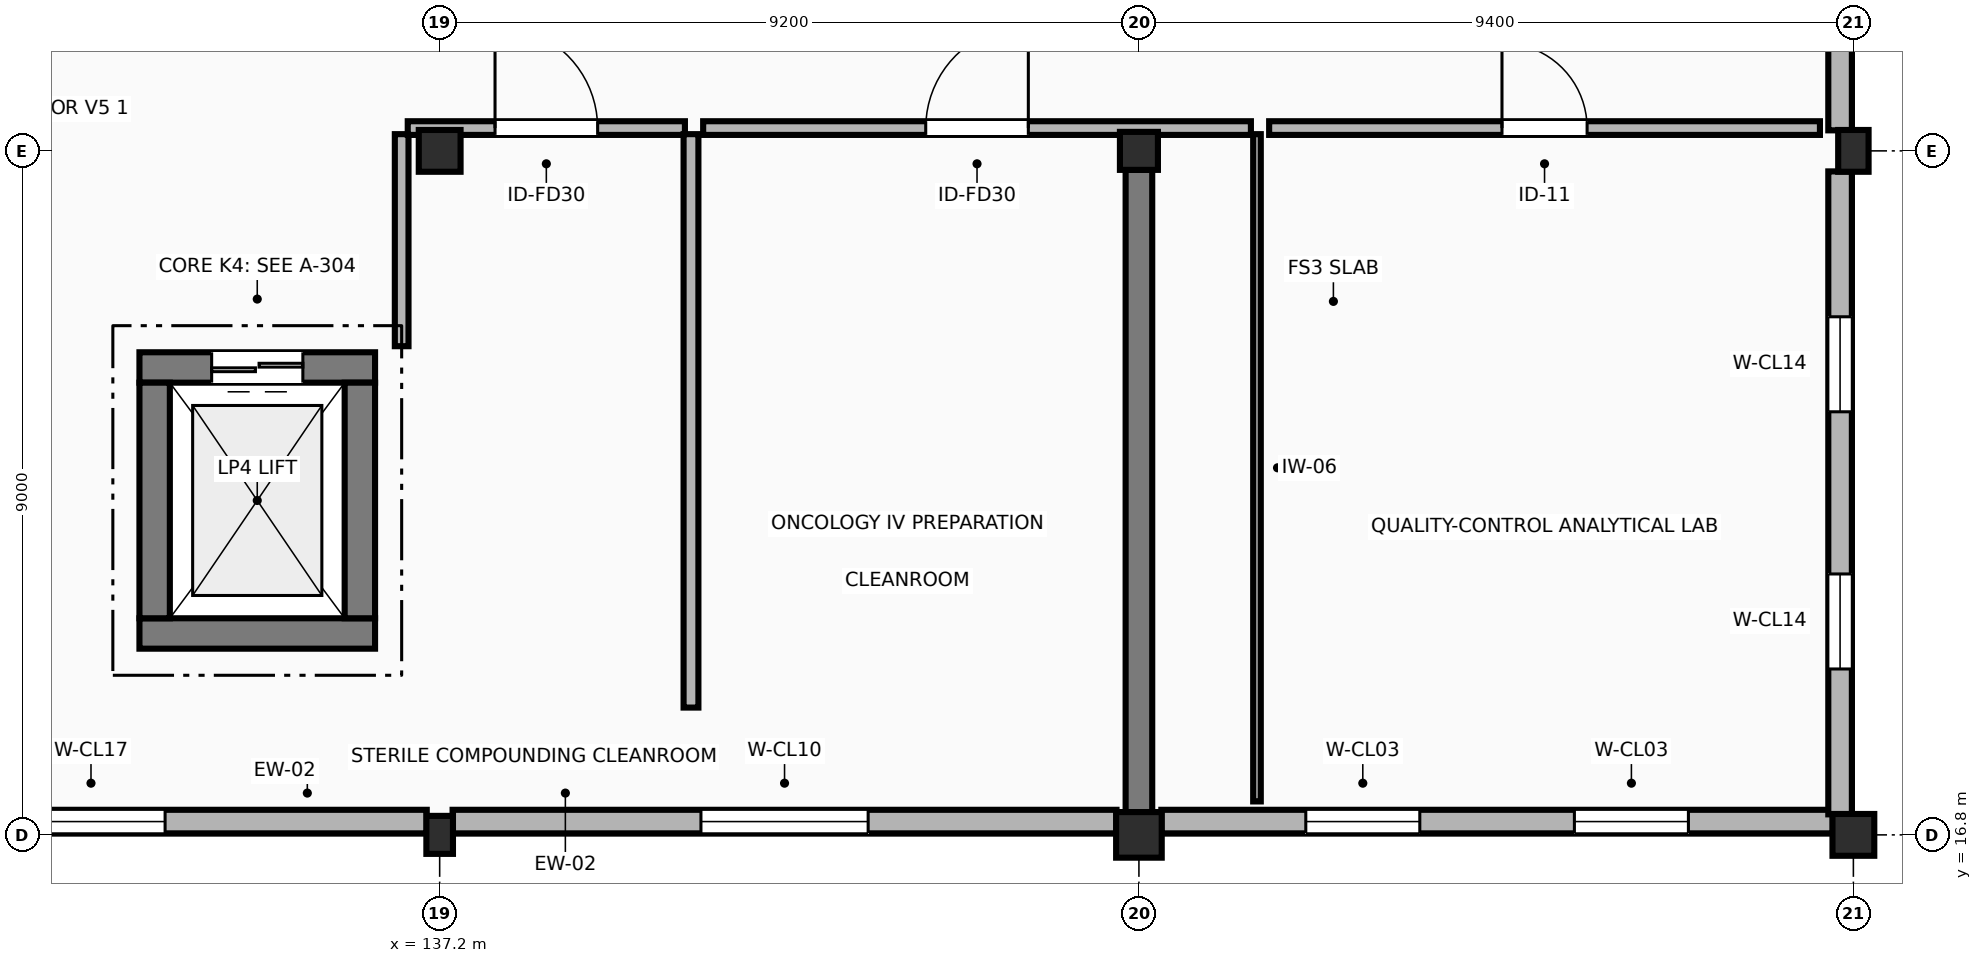
"""IFC4 building model, lengths in metres.
Left out: names, types, materials, properties, quantities, classifications, styles, units other than length and angle.
Written with IfcOpenShell. Run it as: python <this file> out.ifc"""

import sys

from ifc_helpers import new_model, si_unit, direction, frame, frame_2d, origin, origin_2d, place, context, subcontext, project, spatial, rectangle, extrude, element, fill, save


model = new_model("IFC4")
c1 = context("Model", 3, precision=1e-05, world=origin(), true_north=direction((0.0, 1.0)))
c2 = subcontext(c1, "Body", "Model", "MODEL_VIEW")
j1 = project(units=[si_unit("LENGTHUNIT", "METRE"), si_unit("PLANEANGLEUNIT", "RADIAN")], contexts=[c1])
p1 = place(None, origin())
s1 = spatial("IfcSite", under=j1, at=p1, CompositionType="ELEMENT")
p2 = place(p1, origin())
s2 = spatial("IfcBuilding", under=s1, at=p2, CompositionType="ELEMENT")
p3 = place(p2, frame((0.0, 0.0, 9.6)))
s3 = spatial("IfcBuildingStorey", under=s2, at=p3, CompositionType="ELEMENT", Elevation=9.6)
p4 = place(p3, frame((137.2, 16.8, 0.0), z_axis=(0.0, 0.0, 1.0), x_axis=(1.0, 0.0, 0.0)))
e1 = element("IfcColumn", 1, at=p4, inside=s3, PredefinedType="COLUMN", context=c2, shape_type="SweptSolid", body=[
    extrude(rectangle(XDim=0.35, YDim=0.5, at=origin_2d()), origin(), (0.0, 0.0, 1.0), 4.2),
])
p5 = place(p3, frame((137.2, 25.8, 0.0), z_axis=(0.0, 0.0, 1.0), x_axis=(1.0, 0.0, 0.0)))
e2 = element("IfcColumn", 2, at=p5, inside=s3, PredefinedType="COLUMN", context=c2, shape_type="SweptSolid", body=[
    extrude(rectangle(XDim=0.55, YDim=0.55, at=origin_2d()), origin(), (0.0, 0.0, 1.0), 4.2),
])
p6 = place(p3, frame((146.4, 16.8, 0.0), z_axis=(0.0, 0.0, 1.0), x_axis=(1.0, 0.0, 0.0)))
e3 = element("IfcColumn", 3, at=p6, inside=s3, PredefinedType="COLUMN", context=c2, shape_type="SweptSolid", body=[
    extrude(rectangle(XDim=0.6, YDim=0.6, at=origin_2d()), origin(), (0.0, 0.0, 1.0), 4.2),
])
p7 = place(p3, frame((146.4, 25.8, 0.0), z_axis=(0.0, 0.0, 1.0), x_axis=(1.0, 0.0, 0.0)))
e4 = element("IfcColumn", 4, at=p7, inside=s3, PredefinedType="COLUMN", context=c2, shape_type="SweptSolid", body=[
    extrude(rectangle(XDim=0.5, YDim=0.5, at=origin_2d()), origin(), (0.0, 0.0, 1.0), 4.2),
])
p8 = place(p3, frame((155.8, 16.8, 0.0), z_axis=(0.0, 0.0, 1.0), x_axis=(1.0, 0.0, 0.0)))
e5 = element("IfcColumn", 5, at=p8, inside=s3, PredefinedType="COLUMN", context=c2, shape_type="SweptSolid", body=[
    extrude(rectangle(XDim=0.55, YDim=0.55, at=origin_2d()), origin(), (0.0, 0.0, 1.0), 4.2),
])
p9 = place(p3, frame((155.8, 25.8, 0.0), z_axis=(0.0, 0.0, 1.0), x_axis=(1.0, 0.0, 0.0)))
e6 = element("IfcColumn", 6, at=p9, inside=s3, PredefinedType="COLUMN", context=c2, shape_type="SweptSolid", body=[
    extrude(rectangle(XDim=0.4, YDim=0.55, at=origin_2d()), origin(), (0.0, 0.0, 1.0), 4.2),
])
p10 = place(p3, frame((128.195, 16.975, 0.0), z_axis=(0.0, 0.0, 1.0), x_axis=(1.0, 0.0, 0.0)))
e7 = element("IfcWall", 7, at=p10, inside=s3, PredefinedType="STANDARD", context=c2, shape_type="SweptSolid", body=[
    extrude(rectangle(XDim=8.835, YDim=0.31, at=frame_2d((4.417, 0.0))), origin(), (0.0, 0.0, 1.0), 3.255),
])
p11 = place(p10, frame((3.442, 0.0, 0.95)))
e8 = element("IfcOpeningElement", 8, at=p11, cuts=e7, PredefinedType="OPENING", context=c2, shape_type="SweptSolid", body=[
    extrude(rectangle(XDim=1.95, YDim=1.55, at=frame_2d((0.975, 0.775))), frame((0.0, 0.165, 0.0), z_axis=(0.0, -1.0, 0.0), x_axis=(1.0, 0.0, 0.0)), (0.0, 0.0, 1.0), 0.33),
])
p12 = place(p3, frame((137.37, 16.975, 0.0), z_axis=(0.0, 0.0, 1.0), x_axis=(1.0, 0.0, 0.0)))
e9 = element("IfcWall", 9, at=p12, inside=s3, PredefinedType="STANDARD", context=c2, shape_type="SweptSolid", body=[
    extrude(rectangle(XDim=8.735, YDim=0.31, at=frame_2d((4.367, 0.0))), origin(), (0.0, 0.0, 1.0), 3.255),
])
p13 = place(p12, frame((3.268, 0.0, 1.75)))
e10 = element("IfcOpeningElement", 10, at=p13, cuts=e9, PredefinedType="OPENING", context=c2, shape_type="SweptSolid", body=[
    extrude(rectangle(XDim=2.2, YDim=0.85, at=frame_2d((1.1, 0.425))), frame((0.0, 0.165, 0.0), z_axis=(0.0, -1.0, 0.0), x_axis=(1.0, 0.0, 0.0)), (0.0, 0.0, 1.0), 0.33),
])
p14 = place(p3, frame((146.695, 16.975, 0.0), z_axis=(0.0, 0.0, 1.0), x_axis=(1.0, 0.0, 0.0)))
e11 = element("IfcWall", 11, at=p14, inside=s3, PredefinedType="STANDARD", context=c2, shape_type="SweptSolid", body=[
    extrude(rectangle(XDim=8.835, YDim=0.31, at=frame_2d((4.417, 0.0))), origin(), (0.0, 0.0, 1.0), 3.255),
])
p15 = place(p14, frame((1.9, 0.0, 0.95)))
e12 = element("IfcOpeningElement", 12, at=p15, cuts=e11, PredefinedType="OPENING", context=c2, shape_type="SweptSolid", body=[
    extrude(rectangle(XDim=1.5, YDim=1.65, at=frame_2d((0.75, 0.825))), frame((0.0, 0.165, 0.0), z_axis=(0.0, -1.0, 0.0), x_axis=(1.0, 0.0, 0.0)), (0.0, 0.0, 1.0), 0.33),
])
p16 = place(p14, frame((5.435, 0.0, 0.95)))
e13 = element("IfcOpeningElement", 13, at=p16, cuts=e11, PredefinedType="OPENING", context=c2, shape_type="SweptSolid", body=[
    extrude(rectangle(XDim=1.5, YDim=1.65, at=frame_2d((0.75, 0.825))), frame((0.0, 0.165, 0.0), z_axis=(0.0, -1.0, 0.0), x_axis=(1.0, 0.0, 0.0)), (0.0, 0.0, 1.0), 0.33),
])
p17 = place(p3, frame((155.625, 17.07, 0.0), z_axis=(0.0, 0.0, 1.0), x_axis=(0.0, 1.0, 0.0)))
e14 = element("IfcWall", 14, at=p17, inside=s3, PredefinedType="STANDARD", context=c2, shape_type="SweptSolid", body=[
    extrude(rectangle(XDim=8.46, YDim=0.31, at=frame_2d((4.23, 0.0))), origin(), (0.0, 0.0, 1.0), 3.365),
])
p18 = place(p17, frame((1.913, 0.0, 0.95)))
e15 = element("IfcOpeningElement", 15, at=p18, cuts=e14, PredefinedType="OPENING", context=c2, shape_type="SweptSolid", body=[
    extrude(rectangle(XDim=1.25, YDim=1.55, at=frame_2d((0.625, 0.775))), frame((0.0, 0.165, 0.0), z_axis=(0.0, -1.0, 0.0), x_axis=(1.0, 0.0, 0.0)), (0.0, 0.0, 1.0), 0.33),
])
p19 = place(p17, frame((5.297, 0.0, 0.95)))
e16 = element("IfcOpeningElement", 16, at=p19, cuts=e14, PredefinedType="OPENING", context=c2, shape_type="SweptSolid", body=[
    extrude(rectangle(XDim=1.25, YDim=1.55, at=frame_2d((0.625, 0.775))), frame((0.0, 0.165, 0.0), z_axis=(0.0, -1.0, 0.0), x_axis=(1.0, 0.0, 0.0)), (0.0, 0.0, 1.0), 0.33),
])
p20 = place(p3, frame((155.625, 26.07, 0.0), z_axis=(0.0, 0.0, 1.0), x_axis=(0.0, 1.0, 0.0)))
e17 = element("IfcWall", 17, at=p20, inside=s3, PredefinedType="STANDARD", context=c2, shape_type="SweptSolid", body=[
    extrude(rectangle(XDim=8.235, YDim=0.31, at=frame_2d((4.117, 0.0))), origin(), (0.0, 0.0, 1.0), 3.365),
])
p21 = place(p3, frame((133.25, 19.45, 0.0), z_axis=(0.0, 0.0, 1.0), x_axis=(1.0, 0.0, 0.0)))
e18 = element("IfcWall", 18, at=p21, inside=s3, PredefinedType="SHEAR", context=c2, shape_type="SweptSolid", body=[
    extrude(rectangle(XDim=3.1, YDim=0.4, at=frame_2d((1.55, 0.0))), origin(), (0.0, 0.0, 1.0), 4.2),
])
p22 = place(p3, frame((136.35, 22.95, 0.0), z_axis=(0.0, 0.0, 1.0), x_axis=(-1.0, 0.0, 0.0)))
e19 = element("IfcWall", 19, at=p22, inside=s3, PredefinedType="SHEAR", context=c2, shape_type="SweptSolid", body=[
    extrude(rectangle(XDim=3.1, YDim=0.4, at=frame_2d((1.55, 0.0))), origin(), (0.0, 0.0, 1.0), 4.2),
])
p23 = place(p22, frame((0.95, 0.0, 0.0)))
e20 = element("IfcOpeningElement", 20, at=p23, cuts=e19, PredefinedType="OPENING", context=c2, shape_type="SweptSolid", body=[
    extrude(rectangle(XDim=1.2, YDim=2.2, at=frame_2d((0.6, 1.1))), frame((0.0, 0.21, 0.0), z_axis=(0.0, -1.0, 0.0), x_axis=(1.0, 0.0, 0.0)), (0.0, 0.0, 1.0), 0.42),
])
for number, where, z_axis, x_axis in (
    (21, (133.45, 19.65, 0.0), (0.0, 0.0, 1.0), (0.0, 1.0, 0.0)),
    (22, (136.15, 22.75, 0.0), (0.0, 0.0, 1.0), (0.0, -1.0, 0.0)),
):
    element("IfcWall", number, at=place(p3, frame(where, z_axis=z_axis, x_axis=x_axis)), inside=s3, PredefinedType="SHEAR", context=c2, shape_type="SweptSolid", body=[
        extrude(rectangle(XDim=3.1, YDim=0.4, at=frame_2d((1.55, 0.0))), origin(), (0.0, 0.0, 1.0), 4.2),
    ])
p24 = place(p3, frame((146.4, 17.1, 0.0), z_axis=(0.0, 0.0, 1.0), x_axis=(0.0, 1.0, 0.0)))
e23 = element("IfcWall", 23, at=p24, inside=s3, PredefinedType="SHEAR", context=c2, shape_type="SweptSolid", body=[
    extrude(rectangle(XDim=8.45, YDim=0.35, at=frame_2d((4.225, 0.0))), origin(), (0.0, 0.0, 1.0), 3.92),
])
p25 = place(p3, frame((136.7, 23.23, 0.0), z_axis=(0.0, 0.0, 1.0), x_axis=(0.0, 1.0, 0.0)))
e24 = element("IfcWall", 24, at=p25, inside=s3, PredefinedType="PARTITIONING", context=c2, shape_type="SweptSolid", body=[
    extrude(rectangle(XDim=2.79, YDim=0.18, at=frame_2d((1.395, 0.0))), origin(), (0.0, 0.0, 1.0), 3.405),
])
p26 = place(p3, frame((136.78, 26.1, 0.0), z_axis=(0.0, 0.0, 1.0), x_axis=(1.0, 0.0, 0.0)))
e25 = element("IfcWall", 25, at=p26, inside=s3, PredefinedType="PARTITIONING", context=c2, shape_type="SweptSolid", body=[
    extrude(rectangle(XDim=3.647, YDim=0.18, at=frame_2d((1.823, 0.0))), origin(), (0.0, 0.0, 1.0), 3.255),
])
p27 = place(p26, frame((1.148, 0.0, 0.0)))
e26 = element("IfcOpeningElement", 26, at=p27, cuts=e25, PredefinedType="OPENING", context=c2, shape_type="SweptSolid", body=[
    extrude(rectangle(XDim=1.35, YDim=2.2, at=frame_2d((0.675, 1.1))), frame((0.0, 0.1, 0.0), z_axis=(0.0, -1.0, 0.0), x_axis=(1.0, 0.0, 0.0)), (0.0, 0.0, 1.0), 0.2),
])
p28 = place(p3, frame((140.507, 26.02, 0.0), z_axis=(0.0, 0.0, 1.0), x_axis=(0.0, -1.0, 0.0)))
e27 = element("IfcWall", 27, at=p28, inside=s3, PredefinedType="PARTITIONING", context=c2, shape_type="SweptSolid", body=[
    extrude(rectangle(XDim=7.545, YDim=0.195, at=frame_2d((3.772, 0.0))), origin(), (0.0, 0.0, 1.0), 3.599),
])
p29 = place(p3, frame((140.667, 26.1, 0.0), z_axis=(0.0, 0.0, 1.0), x_axis=(1.0, 0.0, 0.0)))
e28 = element("IfcWall", 28, at=p29, inside=s3, PredefinedType="PARTITIONING", context=c2, shape_type="SweptSolid", body=[
    extrude(rectangle(XDim=7.207, YDim=0.18, at=frame_2d((3.603, 0.0))), origin(), (0.0, 0.0, 1.0), 3.255),
])
p30 = place(p29, frame((2.928, 0.0, 0.0)))
e29 = element("IfcOpeningElement", 29, at=p30, cuts=e28, PredefinedType="OPENING", context=c2, shape_type="SweptSolid", body=[
    extrude(rectangle(XDim=1.35, YDim=2.2, at=frame_2d((0.675, 1.1))), frame((0.0, 0.1, 0.0), z_axis=(0.0, -1.0, 0.0), x_axis=(1.0, 0.0, 0.0)), (0.0, 0.0, 1.0), 0.2),
])
p31 = place(p3, frame((147.953, 26.02, 0.0), z_axis=(0.0, 0.0, 1.0), x_axis=(0.0, -1.0, 0.0)))
e30 = element("IfcWall", 30, at=p31, inside=s3, PredefinedType="PARTITIONING", context=c2, shape_type="SweptSolid", body=[
    extrude(rectangle(XDim=8.78, YDim=0.1, at=frame_2d((4.39, 0.0))), origin(), (0.0, 0.0, 1.0), 3.92),
])
p32 = place(p3, frame((148.113, 26.1, 0.0), z_axis=(0.0, 0.0, 1.0), x_axis=(1.0, 0.0, 0.0)))
e31 = element("IfcWall", 31, at=p32, inside=s3, PredefinedType="PARTITIONING", context=c2, shape_type="SweptSolid", body=[
    extrude(rectangle(XDim=7.247, YDim=0.18, at=frame_2d((3.624, 0.0))), origin(), (0.0, 0.0, 1.0), 3.255),
])
p33 = place(p32, frame((3.063, 0.0, 0.0)))
e32 = element("IfcOpeningElement", 32, at=p33, cuts=e31, PredefinedType="OPENING", context=c2, shape_type="SweptSolid", body=[
    extrude(rectangle(XDim=1.12, YDim=2.16, at=frame_2d((0.56, 1.08))), frame((0.0, 0.1, 0.0), z_axis=(0.0, -1.0, 0.0), x_axis=(1.0, 0.0, 0.0)), (0.0, 0.0, 1.0), 0.2),
])
p34 = place(p11, origin())
e33 = element("IfcWindow", 33, at=p34, inside=s3, PartitioningType="SINGLE_PANEL", PredefinedType="WINDOW", context=c2, shape_type="SweptSolid", body=[
    extrude(rectangle(XDim=1.95, YDim=1.55, at=frame_2d((0.975, 0.775))), frame((0.0, 0.03, 0.0), z_axis=(0.0, -1.0, 0.0), x_axis=(1.0, 0.0, 0.0)), (0.0, 0.0, 1.0), 0.06),
])
fill(e8, e33)
p35 = place(p13, origin())
e34 = element("IfcWindow", 34, at=p35, inside=s3, PartitioningType="SINGLE_PANEL", PredefinedType="WINDOW", context=c2, shape_type="SweptSolid", body=[
    extrude(rectangle(XDim=2.2, YDim=0.85, at=frame_2d((1.1, 0.425))), frame((0.0, 0.03, 0.0), z_axis=(0.0, -1.0, 0.0), x_axis=(1.0, 0.0, 0.0)), (0.0, 0.0, 1.0), 0.06),
])
fill(e10, e34)
p36 = place(p15, origin())
e35 = element("IfcWindow", 35, at=p36, inside=s3, PartitioningType="SINGLE_PANEL", PredefinedType="WINDOW", context=c2, shape_type="SweptSolid", body=[
    extrude(rectangle(XDim=1.5, YDim=1.65, at=frame_2d((0.75, 0.825))), frame((0.0, 0.03, 0.0), z_axis=(0.0, -1.0, 0.0), x_axis=(1.0, 0.0, 0.0)), (0.0, 0.0, 1.0), 0.06),
])
fill(e12, e35)
p37 = place(p16, origin())
e36 = element("IfcWindow", 36, at=p37, inside=s3, PartitioningType="SINGLE_PANEL", PredefinedType="WINDOW", context=c2, shape_type="SweptSolid", body=[
    extrude(rectangle(XDim=1.5, YDim=1.65, at=frame_2d((0.75, 0.825))), frame((0.0, 0.03, 0.0), z_axis=(0.0, -1.0, 0.0), x_axis=(1.0, 0.0, 0.0)), (0.0, 0.0, 1.0), 0.06),
])
fill(e13, e36)
p38 = place(p18, origin())
e37 = element("IfcWindow", 37, at=p38, inside=s3, PartitioningType="SINGLE_PANEL", PredefinedType="WINDOW", context=c2, shape_type="SweptSolid", body=[
    extrude(rectangle(XDim=1.25, YDim=1.55, at=frame_2d((0.625, 0.775))), frame((0.0, 0.03, 0.0), z_axis=(0.0, -1.0, 0.0), x_axis=(1.0, 0.0, 0.0)), (0.0, 0.0, 1.0), 0.06),
])
fill(e15, e37)
p39 = place(p19, origin())
e38 = element("IfcWindow", 38, at=p39, inside=s3, PartitioningType="SINGLE_PANEL", PredefinedType="WINDOW", context=c2, shape_type="SweptSolid", body=[
    extrude(rectangle(XDim=1.25, YDim=1.55, at=frame_2d((0.625, 0.775))), frame((0.0, 0.03, 0.0), z_axis=(0.0, -1.0, 0.0), x_axis=(1.0, 0.0, 0.0)), (0.0, 0.0, 1.0), 0.06),
])
fill(e16, e38)
p40 = place(p23, origin())
e39 = element("IfcDoor", 39, at=p40, inside=s3, OperationType="DOUBLE_DOOR_SLIDING", PredefinedType="DOOR", context=c2, shape_type="SweptSolid", body=[
    extrude(rectangle(XDim=1.2, YDim=2.2, at=frame_2d((0.6, 1.1))), frame((0.0, 0.025, 0.0), z_axis=(0.0, -1.0, 0.0), x_axis=(1.0, 0.0, 0.0)), (0.0, 0.0, 1.0), 0.05),
])
fill(e20, e39)
p41 = place(p27, origin())
e40 = element("IfcDoor", 40, at=p41, inside=s3, OperationType="SINGLE_SWING_LEFT", PredefinedType="DOOR", context=c2, shape_type="SweptSolid", body=[
    extrude(rectangle(XDim=1.35, YDim=2.2, at=frame_2d((0.675, 1.1))), frame((0.0, 0.025, 0.0), z_axis=(0.0, -1.0, 0.0), x_axis=(1.0, 0.0, 0.0)), (0.0, 0.0, 1.0), 0.05),
])
fill(e26, e40)
p42 = place(p30, origin())
e41 = element("IfcDoor", 41, at=p42, inside=s3, OperationType="SINGLE_SWING_RIGHT", PredefinedType="DOOR", context=c2, shape_type="SweptSolid", body=[
    extrude(rectangle(XDim=1.35, YDim=2.2, at=frame_2d((0.675, 1.1))), frame((0.0, 0.025, 0.0), z_axis=(0.0, -1.0, 0.0), x_axis=(1.0, 0.0, 0.0)), (0.0, 0.0, 1.0), 0.05),
])
fill(e29, e41)
p43 = place(p33, origin())
e42 = element("IfcDoor", 42, at=p43, inside=s3, OperationType="SINGLE_SWING_LEFT", PredefinedType="DOOR", context=c2, shape_type="SweptSolid", body=[
    extrude(rectangle(XDim=1.12, YDim=2.16, at=frame_2d((0.56, 1.08))), frame((0.0, 0.025, 0.0), z_axis=(0.0, -1.0, 0.0), x_axis=(1.0, 0.0, 0.0)), (0.0, 0.0, 1.0), 0.05),
])
fill(e32, e42)
save(model, sys.argv[1])
